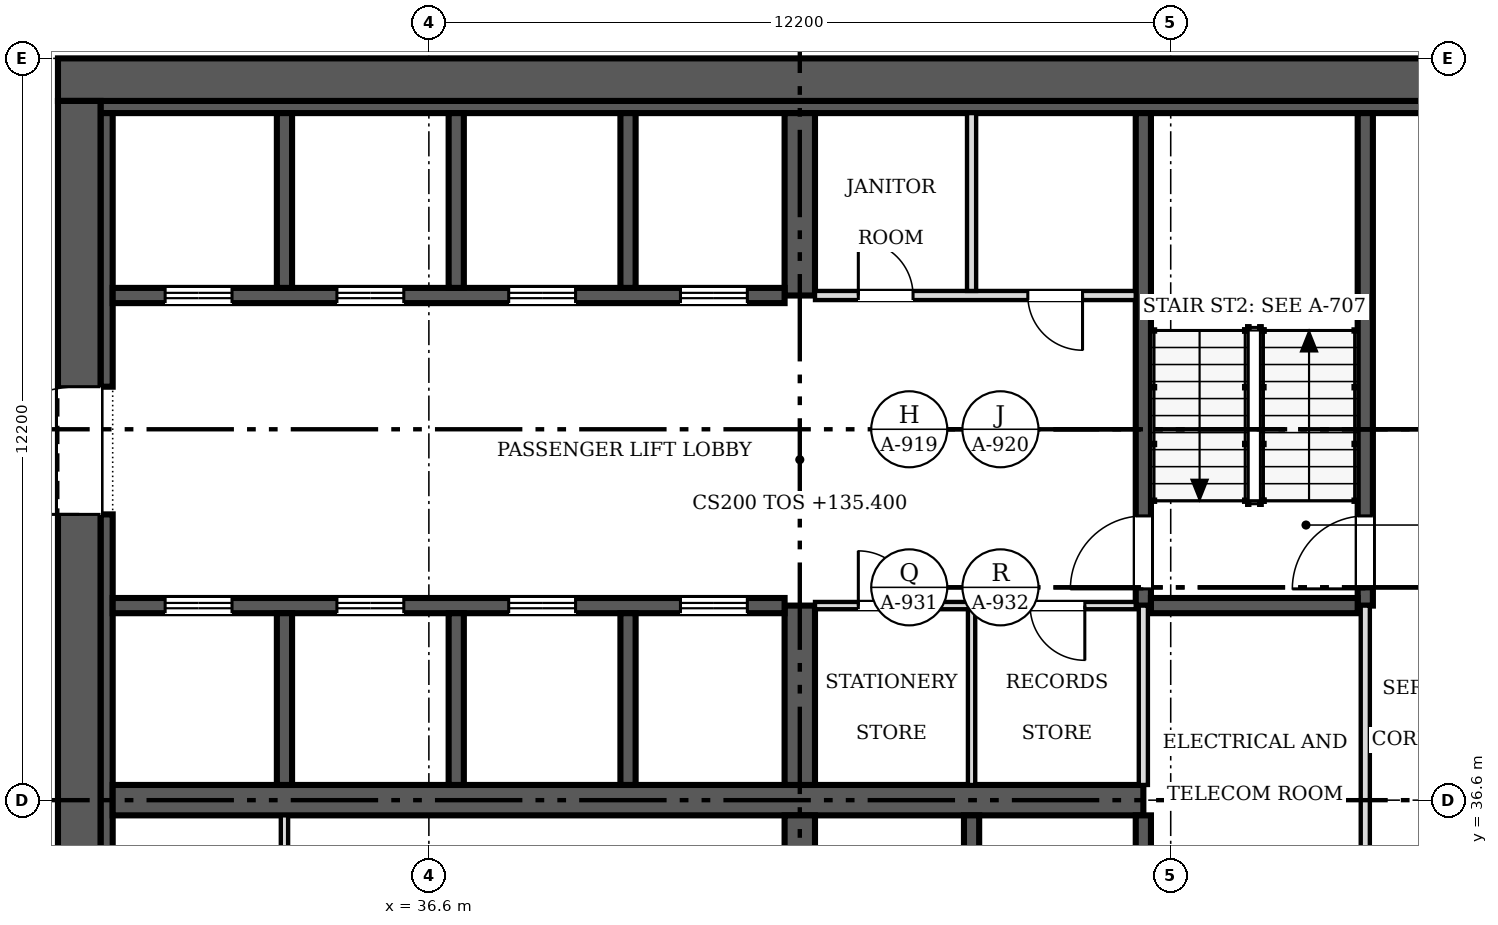
"""IFC4 building model, lengths in metres.
Left out: names, types, materials, properties, quantities, classifications, styles, units other than length and angle.
Written with IfcOpenShell. Run it as: python <this file> out.ifc"""

import sys

from ifc_helpers import new_model, si_unit, direction, frame, frame_2d, origin, place, context, subcontext, project, spatial, rectangle, extrude, source, transform, mapped, element, fill, save


model = new_model("IFC4")
c1 = context("Model", 3, precision=1e-05, world=origin(), true_north=direction((0.0, 1.0)))
c2 = subcontext(c1, "Body", "Model", "MODEL_VIEW")
j1 = project(units=[si_unit("LENGTHUNIT", "METRE"), si_unit("PLANEANGLEUNIT", "RADIAN")], contexts=[c1])
p1 = place(None, origin())
s1 = spatial("IfcSite", under=j1, at=p1, CompositionType="ELEMENT")
p2 = place(p1, origin())
s2 = spatial("IfcBuilding", under=s1, at=p2, CompositionType="ELEMENT")
p3 = place(p2, frame((0.0, 0.0, 135.4)))
s3 = spatial("IfcBuildingStorey", under=s2, at=p3, CompositionType="ELEMENT", Elevation=135.4)
p4 = place(p3, frame((30.85, 25.1, 0.0), z_axis=(0.0, 0.0, 1.0), x_axis=(0.0, 1.0, 0.0)))
e1 = element("IfcWall", 1, at=p4, inside=s3, PredefinedType="SHEAR", context=c2, shape_type="SweptSolid", body=[
    extrude(rectangle(XDim=23.0, YDim=0.7, at=frame_2d((11.5, 0.0))), origin(), (0.0, 0.0, 1.0), 3.8),
])
m1 = source(origin(), c2, "Body", "SweptSolid", [
    extrude(rectangle(XDim=2.1, YDim=2.4, at=frame_2d((1.05, 1.2))), frame((0.0, 0.36, 0.0), z_axis=(0.0, -1.0, 0.0), x_axis=(1.0, 0.0, 0.0)), (0.0, 0.0, 1.0), 0.72),
])
p5 = place(p4, frame((4.7, 0.0, 0.0)))
e2 = element("IfcOpeningElement", 2, at=p5, cuts=e1, PredefinedType="OPENING", context=c2, shape_type="MappedRepresentation", body=[
    mapped(m1, transform((0.0, 0.0, 0.0), scale=1.0)),
])
p6 = place(p4, frame((16.2, 0.0, 0.0)))
e3 = element("IfcOpeningElement", 3, at=p6, cuts=e1, PredefinedType="OPENING", context=c2, shape_type="MappedRepresentation", body=[
    mapped(m1, transform((0.0, 0.0, 0.0), scale=1.0)),
])
p7 = place(p3, frame((30.5, 48.45, 0.0), z_axis=(0.0, 0.0, 1.0), x_axis=(1.0, 0.0, 0.0)))
e4 = element("IfcWall", 4, at=p7, inside=s3, PredefinedType="SHEAR", context=c2, shape_type="SweptSolid", body=[
    extrude(rectangle(XDim=24.4, YDim=0.7, at=frame_2d((12.2, 0.0))), origin(), (0.0, 0.0, 1.0), 3.8),
])
p8 = place(p3, frame((31.2, 48.0, 0.0), z_axis=(0.0, 0.0, 1.0), x_axis=(1.0, 0.0, 0.0)))
e5 = element("IfcWall", 5, at=p8, inside=s3, PredefinedType="SOLIDWALL", context=c2, shape_type="SweptSolid", body=[
    extrude(rectangle(XDim=23.0, YDim=0.2, at=frame_2d((11.5, 0.0))), origin(), (0.0, 0.0, 1.0), 3.8),
])
p9 = place(p3, frame((31.3, 31.9, 0.0), z_axis=(0.0, 0.0, 1.0), x_axis=(0.0, 1.0, 0.0)))
e6 = element("IfcWall", 6, at=p9, inside=s3, PredefinedType="SOLIDWALL", context=c2, shape_type="SweptSolid", body=[
    extrude(rectangle(XDim=9.4, YDim=0.2, at=frame_2d((4.7, 0.0))), origin(), (0.0, 0.0, 1.0), 3.8),
])
p10 = place(p3, frame((31.3, 43.4, 0.0), z_axis=(0.0, 0.0, 1.0), x_axis=(0.0, 1.0, 0.0)))
e7 = element("IfcWall", 7, at=p10, inside=s3, PredefinedType="SOLIDWALL", context=c2, shape_type="SweptSolid", body=[
    extrude(rectangle(XDim=4.5, YDim=0.2, at=frame_2d((2.25, 0.0))), origin(), (0.0, 0.0, 1.0), 3.8),
])
p11 = place(p3, frame((31.4, 36.6, 0.0), z_axis=(0.0, 0.0, 1.0), x_axis=(1.0, 0.0, 0.0)))
e8 = element("IfcWall", 8, at=p11, inside=s3, PredefinedType="SHEAR", context=c2, shape_type="SweptSolid", body=[
    extrude(rectangle(XDim=16.95, YDim=0.5, at=frame_2d((8.475, 0.0))), origin(), (0.0, 0.0, 1.0), 3.8),
])
p12 = place(p3, frame((42.7, 36.35, 0.0), z_axis=(0.0, 0.0, 1.0), x_axis=(0.0, -1.0, 0.0)))
e9 = element("IfcWall", 9, at=p12, inside=s3, PredefinedType="SHEAR", context=c2, shape_type="SweptSolid", body=[
    extrude(rectangle(XDim=11.05, YDim=0.5, at=frame_2d((5.525, 0.0))), origin(), (0.0, 0.0, 1.0), 3.8),
])
m2 = source(origin(), c2, "Body", "SweptSolid", [
    extrude(rectangle(XDim=0.9, YDim=2.1, at=frame_2d((0.45, 1.05))), frame((0.0, 0.26, 0.0), z_axis=(0.0, -1.0, 0.0), x_axis=(1.0, 0.0, 0.0)), (0.0, 0.0, 1.0), 0.52),
])
p13 = place(p12, frame((6.5, 0.0, 0.0)))
e10 = element("IfcOpeningElement", 10, at=p13, cuts=e9, PredefinedType="OPENING", context=c2, shape_type="MappedRepresentation", body=[
    mapped(m2, transform((0.0, 0.0, 0.0), scale=1.0)),
])
m3 = source(origin(), c2, "Body", "SweptSolid", [
    extrude(rectangle(XDim=1.1, YDim=2.1, at=frame_2d((0.55, 1.05))), frame((0.0, 0.26, 0.0), z_axis=(0.0, -1.0, 0.0), x_axis=(1.0, 0.0, 0.0)), (0.0, 0.0, 1.0), 0.52),
])
p14 = place(p12, frame((3.8, 0.0, 0.0)))
e11 = element("IfcOpeningElement", 11, at=p14, cuts=e9, PredefinedType="OPENING", context=c2, shape_type="MappedRepresentation", body=[
    mapped(m3, transform((0.0, 0.0, 0.0), scale=1.0)),
])
p15 = place(p3, frame((42.7, 36.85, 0.0), z_axis=(0.0, 0.0, 1.0), x_axis=(0.0, 1.0, 0.0)))
e12 = element("IfcWall", 12, at=p15, inside=s3, PredefinedType="SHEAR", context=c2, shape_type="SweptSolid", body=[
    extrude(rectangle(XDim=2.95, YDim=0.5, at=frame_2d((1.475, 0.0))), origin(), (0.0, 0.0, 1.0), 3.8),
])
p16 = place(p3, frame((42.7, 44.9, 0.0), z_axis=(0.0, 0.0, 1.0), x_axis=(0.0, 1.0, 0.0)))
e13 = element("IfcWall", 13, at=p16, inside=s3, PredefinedType="SHEAR", context=c2, shape_type="SweptSolid", body=[
    extrude(rectangle(XDim=3.0, YDim=0.5, at=frame_2d((1.5, 0.0))), origin(), (0.0, 0.0, 1.0), 3.8),
])
p17 = place(p3, frame((31.4, 39.8, 0.0), z_axis=(0.0, 0.0, 1.0), x_axis=(1.0, 0.0, 0.0)))
e14 = element("IfcWall", 14, at=p17, inside=s3, PredefinedType="SOLIDWALL", context=c2, shape_type="SweptSolid", body=[
    extrude(rectangle(XDim=11.05, YDim=0.25, at=frame_2d((5.525, 0.0))), origin(), (0.0, 0.0, 1.0), 3.8),
])
m4 = source(origin(), c2, "Body", "SweptSolid", [
    extrude(rectangle(XDim=1.1, YDim=2.1, at=frame_2d((0.55, 1.05))), frame((0.0, 0.135, 0.0), z_axis=(0.0, -1.0, 0.0), x_axis=(1.0, 0.0, 0.0)), (0.0, 0.0, 1.0), 0.27),
])
p18 = place(p17, frame((0.863, 0.0, 0.0)))
e15 = element("IfcOpeningElement", 15, at=p18, cuts=e14, PredefinedType="OPENING", context=c2, shape_type="MappedRepresentation", body=[
    mapped(m4, transform((0.0, 0.0, 0.0), scale=1.0)),
])
p19 = place(p17, frame((3.688, 0.0, 0.0)))
e16 = element("IfcOpeningElement", 16, at=p19, cuts=e14, PredefinedType="OPENING", context=c2, shape_type="MappedRepresentation", body=[
    mapped(m4, transform((0.0, 0.0, 0.0), scale=1.0)),
])
p20 = place(p17, frame((6.512, 0.0, 0.0)))
e17 = element("IfcOpeningElement", 17, at=p20, cuts=e14, PredefinedType="OPENING", context=c2, shape_type="MappedRepresentation", body=[
    mapped(m4, transform((0.0, 0.0, 0.0), scale=1.0)),
])
p21 = place(p17, frame((9.337, 0.0, 0.0)))
e18 = element("IfcOpeningElement", 18, at=p21, cuts=e14, PredefinedType="OPENING", context=c2, shape_type="MappedRepresentation", body=[
    mapped(m4, transform((0.0, 0.0, 0.0), scale=1.0)),
])
p22 = place(p3, frame((42.45, 44.9, 0.0), z_axis=(0.0, 0.0, 1.0), x_axis=(-1.0, 0.0, 0.0)))
e19 = element("IfcWall", 19, at=p22, inside=s3, PredefinedType="SOLIDWALL", context=c2, shape_type="SweptSolid", body=[
    extrude(rectangle(XDim=11.05, YDim=0.25, at=frame_2d((5.525, 0.0))), origin(), (0.0, 0.0, 1.0), 3.8),
])
p23 = place(p22, frame((9.087, 0.0, 0.0)))
e20 = element("IfcOpeningElement", 20, at=p23, cuts=e19, PredefinedType="OPENING", context=c2, shape_type="MappedRepresentation", body=[
    mapped(m4, transform((0.0, 0.0, 0.0), scale=1.0)),
])
p24 = place(p22, frame((6.262, 0.0, 0.0)))
e21 = element("IfcOpeningElement", 21, at=p24, cuts=e19, PredefinedType="OPENING", context=c2, shape_type="MappedRepresentation", body=[
    mapped(m4, transform((0.0, 0.0, 0.0), scale=1.0)),
])
p25 = place(p22, frame((3.438, 0.0, 0.0)))
e22 = element("IfcOpeningElement", 22, at=p25, cuts=e19, PredefinedType="OPENING", context=c2, shape_type="MappedRepresentation", body=[
    mapped(m4, transform((0.0, 0.0, 0.0), scale=1.0)),
])
p26 = place(p22, frame((0.613, 0.0, 0.0)))
e23 = element("IfcOpeningElement", 23, at=p26, cuts=e19, PredefinedType="OPENING", context=c2, shape_type="MappedRepresentation", body=[
    mapped(m4, transform((0.0, 0.0, 0.0), scale=1.0)),
])
p27 = place(p3, frame((48.35, 36.35, 0.0), z_axis=(0.0, 0.0, 1.0), x_axis=(0.0, -1.0, 0.0)))
e24 = element("IfcWall", 24, at=p27, inside=s3, PredefinedType="SOLIDWALL", context=c2, shape_type="SweptSolid", body=[
    extrude(rectangle(XDim=11.05, YDim=0.25, at=frame_2d((5.525, 0.0))), origin(), (0.0, 0.0, 1.0), 3.8),
])
m5 = source(origin(), c2, "Body", "SweptSolid", [
    extrude(rectangle(XDim=1.2, YDim=2.1, at=frame_2d((0.6, 1.05))), frame((0.0, 0.135, 0.0), z_axis=(0.0, -1.0, 0.0), x_axis=(1.0, 0.0, 0.0)), (0.0, 0.0, 1.0), 0.27),
])
p28 = place(p27, frame((3.225, 0.0, 0.0)))
e25 = element("IfcOpeningElement", 25, at=p28, cuts=e24, PredefinedType="OPENING", context=c2, shape_type="MappedRepresentation", body=[
    mapped(m5, transform((0.0, 0.0, 0.0), scale=1.0)),
])
p29 = place(p3, frame((48.35, 47.9, 0.0), z_axis=(0.0, 0.0, 1.0), x_axis=(0.0, -1.0, 0.0)))
e26 = element("IfcWall", 26, at=p29, inside=s3, PredefinedType="SOLIDWALL", context=c2, shape_type="SweptSolid", body=[
    extrude(rectangle(XDim=8.1, YDim=0.25, at=frame_2d((4.05, 0.0))), origin(), (0.0, 0.0, 1.0), 3.8),
])
p30 = place(p29, frame((6.625, 0.0, 0.0)))
e27 = element("IfcOpeningElement", 27, at=p30, cuts=e26, PredefinedType="OPENING", context=c2, shape_type="MappedRepresentation", body=[
    mapped(m5, transform((0.0, 0.0, 0.0), scale=1.0)),
])
p31 = place(p3, frame((52.0, 39.8, 0.0), z_axis=(0.0, 0.0, 1.0), x_axis=(0.0, 1.0, 0.0)))
e28 = element("IfcWall", 28, at=p31, inside=s3, PredefinedType="SOLIDWALL", context=c2, shape_type="SweptSolid", body=[
    extrude(rectangle(XDim=8.1, YDim=0.25, at=frame_2d((4.05, 0.0))), origin(), (0.0, 0.0, 1.0), 3.8),
])
p32 = place(p31, frame((0.275, 0.0, 0.0)))
e29 = element("IfcOpeningElement", 29, at=p32, cuts=e28, PredefinedType="OPENING", context=c2, shape_type="MappedRepresentation", body=[
    mapped(m5, transform((0.0, 0.0, 0.0), scale=1.0)),
])
p33 = place(p3, frame((48.475, 39.8, 0.0), z_axis=(0.0, 0.0, 1.0), x_axis=(1.0, 0.0, 0.0)))
e30 = element("IfcWall", 30, at=p33, inside=s3, PredefinedType="SOLIDWALL", context=c2, shape_type="SweptSolid", body=[
    extrude(rectangle(XDim=3.4, YDim=0.25, at=frame_2d((1.7, 0.0))), origin(), (0.0, 0.0, 1.0), 3.8),
])
for number, where, z_axis, x_axis in (
    (31, (34.225, 36.85, 0.0), (0.0, 0.0, 1.0), (0.0, 1.0, 0.0)),
    (32, (37.05, 36.85, 0.0), (0.0, 0.0, 1.0), (0.0, 1.0, 0.0)),
    (33, (39.875, 36.85, 0.0), (0.0, 0.0, 1.0), (0.0, 1.0, 0.0)),
):
    element("IfcWall", number, at=place(p3, frame(where, z_axis=z_axis, x_axis=x_axis)), inside=s3, PredefinedType="SOLIDWALL", context=c2, shape_type="SweptSolid", body=[
        extrude(rectangle(XDim=2.825, YDim=0.25, at=frame_2d((1.413, 0.0))), origin(), (0.0, 0.0, 1.0), 3.8),
    ])
p34 = place(p3, frame((45.525, 33.525, 0.0), z_axis=(0.0, 0.0, 1.0), x_axis=(0.0, 1.0, 0.0)))
e34 = element("IfcWall", 34, at=p34, inside=s3, PredefinedType="SOLIDWALL", context=c2, shape_type="SweptSolid", body=[
    extrude(rectangle(XDim=2.825, YDim=0.25, at=frame_2d((1.413, 0.0))), origin(), (0.0, 0.0, 1.0), 3.8),
])
for number, where, z_axis, x_axis in (
    (35, (34.225, 45.025, 0.0), (0.0, 0.0, 1.0), (0.0, 1.0, 0.0)),
    (36, (37.05, 45.025, 0.0), (0.0, 0.0, 1.0), (0.0, 1.0, 0.0)),
    (37, (39.875, 45.025, 0.0), (0.0, 0.0, 1.0), (0.0, 1.0, 0.0)),
):
    element("IfcWall", number, at=place(p3, frame(where, z_axis=z_axis, x_axis=x_axis)), inside=s3, PredefinedType="SOLIDWALL", context=c2, shape_type="SweptSolid", body=[
        extrude(rectangle(XDim=2.875, YDim=0.25, at=frame_2d((1.438, 0.0))), origin(), (0.0, 0.0, 1.0), 3.8),
    ])
p35 = place(p3, frame((52.0, 33.525, 0.0), z_axis=(0.0, 0.0, 1.0), x_axis=(0.0, 1.0, 0.0)))
e38 = element("IfcWall", 38, at=p35, inside=s3, PredefinedType="PARTITIONING", context=c2, shape_type="SweptSolid", body=[
    extrude(rectangle(XDim=6.275, YDim=0.15, at=frame_2d((3.138, 0.0))), origin(), (0.0, 0.0, 1.0), 3.6),
])
m6 = source(origin(), c2, "Body", "SweptSolid", [
    extrude(rectangle(XDim=0.9, YDim=2.1, at=frame_2d((0.45, 1.05))), frame((0.0, 0.085, 0.0), z_axis=(0.0, -1.0, 0.0), x_axis=(1.0, 0.0, 0.0)), (0.0, 0.0, 1.0), 0.17),
])
p36 = place(p35, frame((1.025, 0.0, 0.0)))
e39 = element("IfcOpeningElement", 39, at=p36, cuts=e38, PredefinedType="OPENING", context=c2, shape_type="MappedRepresentation", body=[
    mapped(m6, transform((0.0, 0.0, 0.0), scale=1.0)),
])
p37 = place(p3, frame((48.225, 39.8, 0.0), z_axis=(0.0, 0.0, 1.0), x_axis=(-1.0, 0.0, 0.0)))
e40 = element("IfcWall", 40, at=p37, inside=s3, PredefinedType="PARTITIONING", context=c2, shape_type="SweptSolid", body=[
    extrude(rectangle(XDim=5.275, YDim=0.12, at=frame_2d((2.638, 0.0))), origin(), (0.0, 0.0, 1.0), 3.6),
])
m7 = source(origin(), c2, "Body", "SweptSolid", [
    extrude(rectangle(XDim=0.9, YDim=2.1, at=frame_2d((0.45, 1.05))), frame((0.0, 0.07, 0.0), z_axis=(0.0, -1.0, 0.0), x_axis=(1.0, 0.0, 0.0)), (0.0, 0.0, 1.0), 0.14),
])
p38 = place(p37, frame((3.663, 0.0, 0.0)))
e41 = element("IfcOpeningElement", 41, at=p38, cuts=e40, PredefinedType="OPENING", context=c2, shape_type="MappedRepresentation", body=[
    mapped(m7, transform((0.0, 0.0, 0.0), scale=1.0)),
])
p39 = place(p37, frame((0.837, 0.0, 0.0)))
e42 = element("IfcOpeningElement", 42, at=p39, cuts=e40, PredefinedType="OPENING", context=c2, shape_type="MappedRepresentation", body=[
    mapped(m7, transform((0.0, 0.0, 0.0), scale=1.0)),
])
p40 = place(p3, frame((42.95, 44.9, 0.0), z_axis=(0.0, 0.0, 1.0), x_axis=(1.0, 0.0, 0.0)))
e43 = element("IfcWall", 43, at=p40, inside=s3, PredefinedType="PARTITIONING", context=c2, shape_type="SweptSolid", body=[
    extrude(rectangle(XDim=5.275, YDim=0.15, at=frame_2d((2.638, 0.0))), origin(), (0.0, 0.0, 1.0), 3.6),
])
p41 = place(p40, frame((0.712, 0.0, 0.0)))
e44 = element("IfcOpeningElement", 44, at=p41, cuts=e43, PredefinedType="OPENING", context=c2, shape_type="MappedRepresentation", body=[
    mapped(m6, transform((0.0, 0.0, 0.0), scale=1.0)),
])
p42 = place(p40, frame((3.5, 0.0, 0.0)))
e45 = element("IfcOpeningElement", 45, at=p42, cuts=e43, PredefinedType="OPENING", context=c2, shape_type="MappedRepresentation", body=[
    mapped(m6, transform((0.0, 0.0, 0.0), scale=1.0)),
])
p43 = place(p3, frame((45.525, 36.85, 0.0), z_axis=(0.0, 0.0, 1.0), x_axis=(0.0, 1.0, 0.0)))
e46 = element("IfcWall", 46, at=p43, inside=s3, PredefinedType="PARTITIONING", context=c2, shape_type="SweptSolid", body=[
    extrude(rectangle(XDim=2.89, YDim=0.12, at=frame_2d((1.445, 0.0))), origin(), (0.0, 0.0, 1.0), 3.6),
])
p44 = place(p3, frame((48.35, 36.85, 0.0), z_axis=(0.0, 0.0, 1.0), x_axis=(0.0, 1.0, 0.0)))
e47 = element("IfcWall", 47, at=p44, inside=s3, PredefinedType="PARTITIONING", context=c2, shape_type="SweptSolid", body=[
    extrude(rectangle(XDim=2.95, YDim=0.15, at=frame_2d((1.475, 0.0))), origin(), (0.0, 0.0, 1.0), 3.6),
])
p45 = place(p3, frame((34.225, 33.46, 0.0), z_axis=(0.0, 0.0, 1.0), x_axis=(0.0, 1.0, 0.0)))
e48 = element("IfcWall", 48, at=p45, inside=s3, PredefinedType="PARTITIONING", context=c2, shape_type="SweptSolid", body=[
    extrude(rectangle(XDim=2.89, YDim=0.12, at=frame_2d((1.445, 0.0))), origin(), (0.0, 0.0, 1.0), 3.6),
])
p46 = place(p3, frame((45.525, 44.975, 0.0), z_axis=(0.0, 0.0, 1.0), x_axis=(0.0, 1.0, 0.0)))
e49 = element("IfcWall", 49, at=p46, inside=s3, PredefinedType="PARTITIONING", context=c2, shape_type="SweptSolid", body=[
    extrude(rectangle(XDim=2.925, YDim=0.15, at=frame_2d((1.462, 0.0))), origin(), (0.0, 0.0, 1.0), 3.6),
])
m8 = source(origin(), c2, "Body", "SweptSolid", [
    extrude(rectangle(XDim=2.1, YDim=2.4, at=frame_2d((1.05, 1.2))), frame((0.0, 0.025, 0.0), z_axis=(0.0, -1.0, 0.0), x_axis=(1.0, 0.0, 0.0)), (0.0, 0.0, 1.0), 0.05),
])
p47 = place(p6, origin())
e50 = element("IfcDoor", 50, at=p47, inside=s3, OperationType="DOUBLE_DOOR_SINGLE_SWING", PredefinedType="DOOR", context=c2, shape_type="MappedRepresentation", body=[
    mapped(m8, transform((0.0, 0.0, 0.0), scale=1.0)),
])
fill(e3, e50)
m9 = source(origin(), c2, "Body", "SweptSolid", [
    extrude(rectangle(XDim=1.1, YDim=2.1, at=frame_2d((0.55, 1.05))), frame((0.0, 0.025, 0.0), z_axis=(0.0, -1.0, 0.0), x_axis=(1.0, 0.0, 0.0)), (0.0, 0.0, 1.0), 0.05),
])
p48 = place(p18, origin())
e51 = element("IfcDoor", 51, at=p48, inside=s3, OperationType="DOUBLE_DOOR_SLIDING", PredefinedType="DOOR", context=c2, shape_type="MappedRepresentation", body=[
    mapped(m9, transform((0.0, 0.0, 0.0), scale=1.0)),
])
fill(e15, e51)
p49 = place(p19, origin())
e52 = element("IfcDoor", 52, at=p49, inside=s3, OperationType="DOUBLE_DOOR_SLIDING", PredefinedType="DOOR", context=c2, shape_type="MappedRepresentation", body=[
    mapped(m9, transform((0.0, 0.0, 0.0), scale=1.0)),
])
fill(e16, e52)
p50 = place(p20, origin())
e53 = element("IfcDoor", 53, at=p50, inside=s3, OperationType="DOUBLE_DOOR_SLIDING", PredefinedType="DOOR", context=c2, shape_type="MappedRepresentation", body=[
    mapped(m9, transform((0.0, 0.0, 0.0), scale=1.0)),
])
fill(e17, e53)
p51 = place(p21, origin())
e54 = element("IfcDoor", 54, at=p51, inside=s3, OperationType="DOUBLE_DOOR_SLIDING", PredefinedType="DOOR", context=c2, shape_type="MappedRepresentation", body=[
    mapped(m9, transform((0.0, 0.0, 0.0), scale=1.0)),
])
fill(e18, e54)
p52 = place(p23, origin())
e55 = element("IfcDoor", 55, at=p52, inside=s3, OperationType="DOUBLE_DOOR_SLIDING", PredefinedType="DOOR", context=c2, shape_type="MappedRepresentation", body=[
    mapped(m9, transform((0.0, 0.0, 0.0), scale=1.0)),
])
fill(e20, e55)
p53 = place(p24, origin())
e56 = element("IfcDoor", 56, at=p53, inside=s3, OperationType="DOUBLE_DOOR_SLIDING", PredefinedType="DOOR", context=c2, shape_type="MappedRepresentation", body=[
    mapped(m9, transform((0.0, 0.0, 0.0), scale=1.0)),
])
fill(e21, e56)
p54 = place(p25, origin())
e57 = element("IfcDoor", 57, at=p54, inside=s3, OperationType="DOUBLE_DOOR_SLIDING", PredefinedType="DOOR", context=c2, shape_type="MappedRepresentation", body=[
    mapped(m9, transform((0.0, 0.0, 0.0), scale=1.0)),
])
fill(e22, e57)
p55 = place(p26, origin())
e58 = element("IfcDoor", 58, at=p55, inside=s3, OperationType="DOUBLE_DOOR_SLIDING", PredefinedType="DOOR", context=c2, shape_type="MappedRepresentation", body=[
    mapped(m9, transform((0.0, 0.0, 0.0), scale=1.0)),
])
fill(e23, e58)
m10 = source(origin(), c2, "Body", "SweptSolid", [
    extrude(rectangle(XDim=1.2, YDim=2.1, at=frame_2d((0.6, 1.05))), frame((0.0, 0.025, 0.0), z_axis=(0.0, -1.0, 0.0), x_axis=(1.0, 0.0, 0.0)), (0.0, 0.0, 1.0), 0.05),
])
p56 = place(p30, origin())
e59 = element("IfcDoor", 59, at=p56, inside=s3, OperationType="SINGLE_SWING_RIGHT", PredefinedType="DOOR", context=c2, shape_type="MappedRepresentation", body=[
    mapped(m10, transform((0.0, 0.0, 0.0), scale=1.0)),
])
fill(e27, e59)
p57 = place(p32, origin())
e60 = element("IfcDoor", 60, at=p57, inside=s3, OperationType="SINGLE_SWING_LEFT", PredefinedType="DOOR", context=c2, shape_type="MappedRepresentation", body=[
    mapped(m10, transform((0.0, 0.0, 0.0), scale=1.0)),
])
fill(e29, e60)
m11 = source(origin(), c2, "Body", "SweptSolid", [
    extrude(rectangle(XDim=0.9, YDim=2.1, at=frame_2d((0.45, 1.05))), frame((0.0, 0.025, 0.0), z_axis=(0.0, -1.0, 0.0), x_axis=(1.0, 0.0, 0.0)), (0.0, 0.0, 1.0), 0.05),
])
p58 = place(p38, origin())
e61 = element("IfcDoor", 61, at=p58, inside=s3, OperationType="SINGLE_SWING_RIGHT", PredefinedType="DOOR", context=c2, shape_type="MappedRepresentation", body=[
    mapped(m11, transform((0.0, 0.0, 0.0), scale=1.0)),
])
fill(e41, e61)
p59 = place(p39, origin())
e62 = element("IfcDoor", 62, at=p59, inside=s3, OperationType="SINGLE_SWING_LEFT", PredefinedType="DOOR", context=c2, shape_type="MappedRepresentation", body=[
    mapped(m11, transform((0.0, 0.0, 0.0), scale=1.0)),
])
fill(e42, e62)
p60 = place(p41, origin())
e63 = element("IfcDoor", 63, at=p60, inside=s3, OperationType="SINGLE_SWING_LEFT", PredefinedType="DOOR", context=c2, shape_type="MappedRepresentation", body=[
    mapped(m11, transform((0.0, 0.0, 0.0), scale=1.0)),
])
fill(e44, e63)
p61 = place(p42, origin())
e64 = element("IfcDoor", 64, at=p61, inside=s3, OperationType="SINGLE_SWING_RIGHT", PredefinedType="DOOR", context=c2, shape_type="MappedRepresentation", body=[
    mapped(m11, transform((0.0, 0.0, 0.0), scale=1.0)),
])
fill(e45, e64)
save(model, sys.argv[1])
